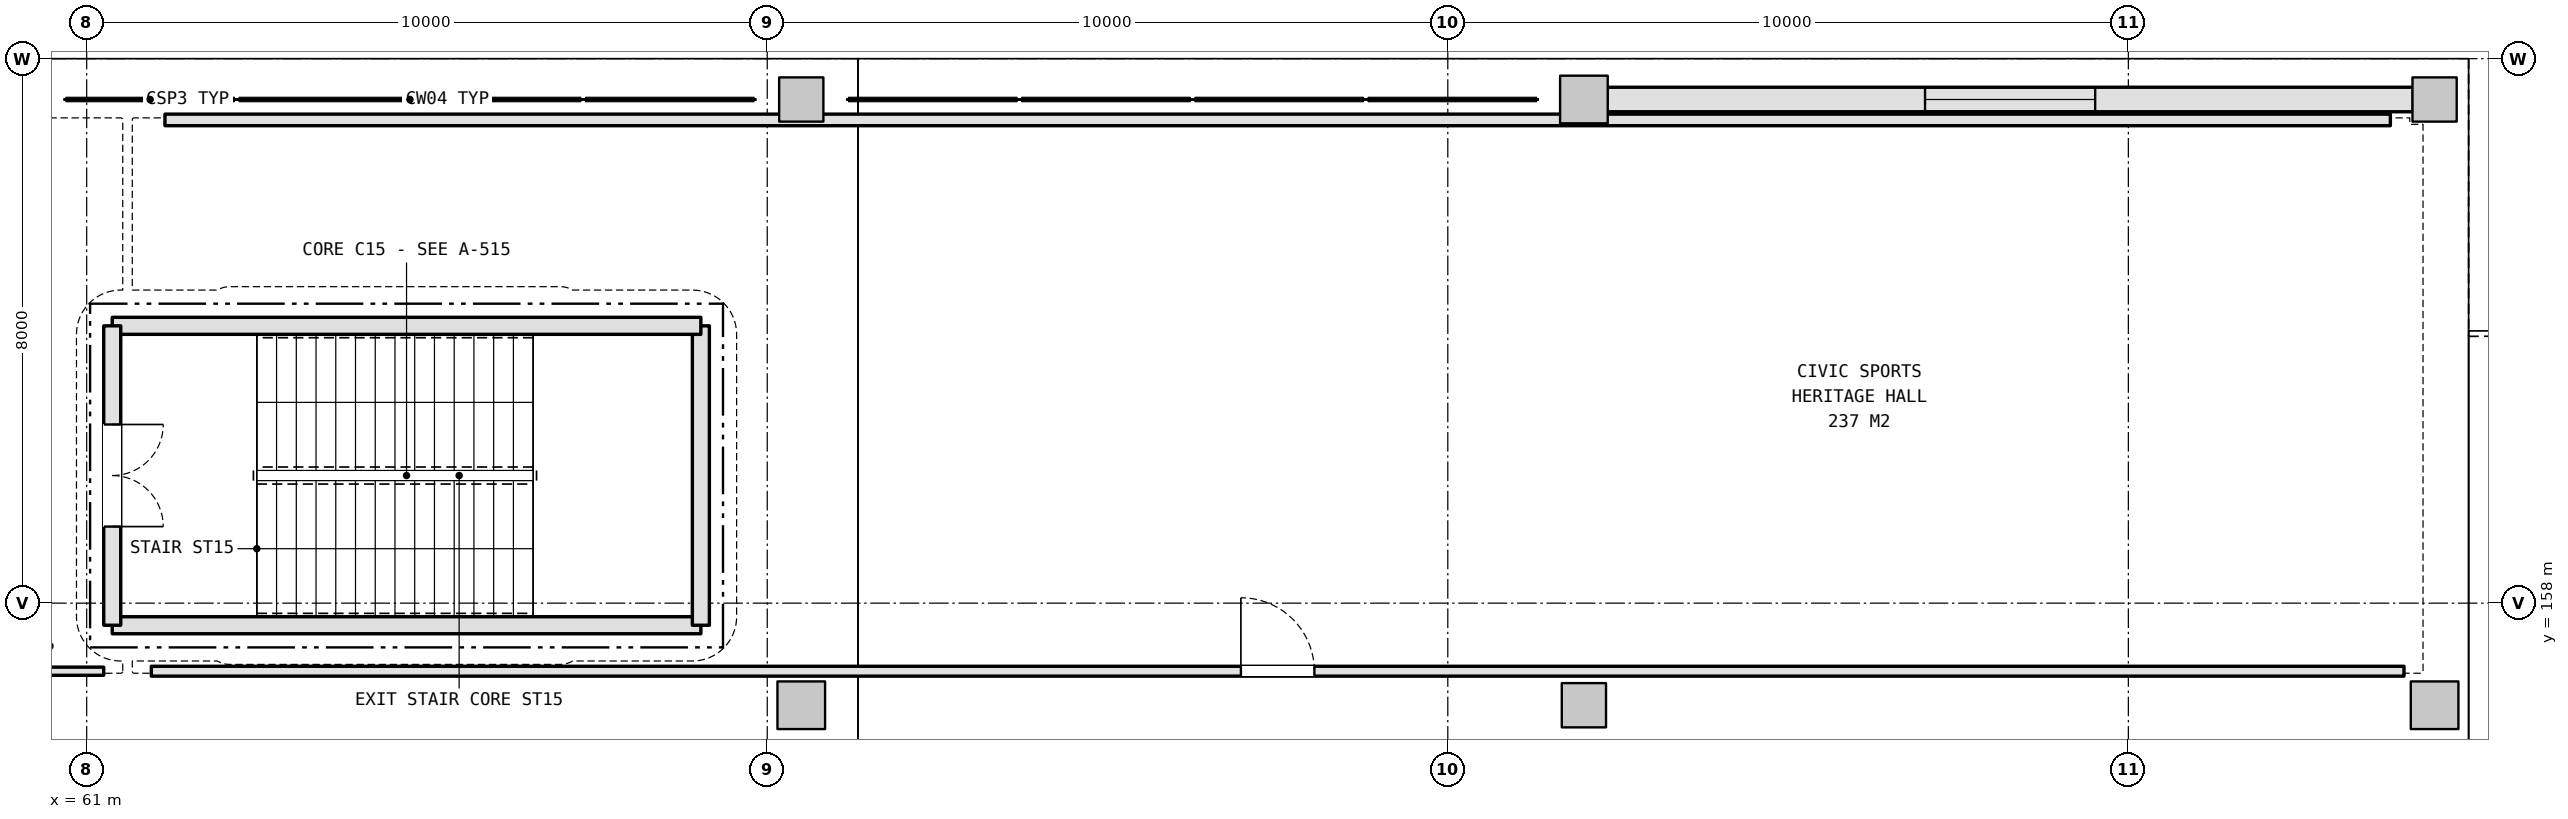
"""IFC4 building model, lengths in metres.
Left out: names, types, materials, properties, quantities, classifications, styles, units other than length and angle.
Written with IfcOpenShell. Run it as: python <this file> out.ifc"""

import sys

from ifc_helpers import new_model, si_unit, direction, frame, frame_2d, origin, origin_2d, place, context, subcontext, project, spatial, rectangle, extrude, element, fill, save


model = new_model("IFC4")
c1 = context("Model", 3, precision=1e-05, world=origin(), true_north=direction((0.0, 1.0)))
c2 = subcontext(c1, "Body", "Model", "MODEL_VIEW")
j1 = project(units=[si_unit("LENGTHUNIT", "METRE"), si_unit("PLANEANGLEUNIT", "RADIAN")], contexts=[c1])
p1 = place(None, origin())
s1 = spatial("IfcSite", under=j1, at=p1, CompositionType="ELEMENT")
p2 = place(p1, origin())
s2 = spatial("IfcBuilding", under=s1, at=p2, CompositionType="ELEMENT")
p3 = place(p2, frame((0.0, 0.0, 10.8)))
s3 = spatial("IfcBuildingStorey", under=s2, at=p3, CompositionType="ELEMENT", Elevation=10.8)
p4 = place(p3, frame((71.5, 156.5, 0.0), z_axis=(0.0, 0.0, 1.0), x_axis=(1.0, 0.0, 0.0)))
e1 = element("IfcColumn", 1, at=p4, inside=s3, PredefinedType="COLUMN", context=c2, shape_type="SweptSolid", body=[
    extrude(rectangle(XDim=0.7, YDim=0.7, at=origin_2d()), origin(), (0.0, 0.0, 1.0), 5.4),
])
for number, where, z_axis, x_axis in (
    (2, (71.5, 165.4, 0.0), (0.0, 0.0, 1.0), (1.0, 0.0, 0.0)),
    (3, (83.0, 156.5, 0.0), (0.0, 0.0, 1.0), (1.0, 0.0, 0.0)),
):
    element("IfcColumn", number, at=place(p3, frame(where, z_axis=z_axis, x_axis=x_axis)), inside=s3, PredefinedType="COLUMN", context=c2, shape_type="SweptSolid", body=[
        extrude(rectangle(XDim=0.65, YDim=0.65, at=origin_2d()), origin(), (0.0, 0.0, 1.0), 5.4),
    ])
for number, where, z_axis, x_axis in (
    (4, (83.0, 165.4, 0.0), (0.0, 0.0, 1.0), (1.0, 0.0, 0.0)),
    (5, (95.5, 156.5, 0.0), (0.0, 0.0, 1.0), (1.0, 0.0, 0.0)),
):
    element("IfcColumn", number, at=place(p3, frame(where, z_axis=z_axis, x_axis=x_axis)), inside=s3, PredefinedType="COLUMN", context=c2, shape_type="SweptSolid", body=[
        extrude(rectangle(XDim=0.7, YDim=0.7, at=origin_2d()), origin(), (0.0, 0.0, 1.0), 5.4),
    ])
p5 = place(p3, frame((95.5, 165.4, 0.0), z_axis=(0.0, 0.0, 1.0), x_axis=(1.0, 0.0, 0.0)))
e6 = element("IfcColumn", 6, at=p5, inside=s3, PredefinedType="COLUMN", context=c2, shape_type="SweptSolid", body=[
    extrude(rectangle(XDim=0.65, YDim=0.65, at=origin_2d()), origin(), (0.0, 0.0, 1.0), 5.4),
])
p6 = place(p3, frame((83.338, 165.4, 0.0), z_axis=(0.0, 0.0, 1.0), x_axis=(1.0, 0.0, 0.0)))
e7 = element("IfcWall", 7, at=p6, inside=s3, PredefinedType="SOLIDWALL", context=c2, shape_type="SweptSolid", body=[
    extrude(rectangle(XDim=11.849, YDim=0.36, at=frame_2d((5.925, 0.0))), origin(), (0.0, 0.0, 1.0), 4.455),
])
p7 = place(p6, frame((4.675, 0.0, 1.05)))
e8 = element("IfcOpeningElement", 8, at=p7, cuts=e7, PredefinedType="OPENING", context=c2, shape_type="SweptSolid", body=[
    extrude(rectangle(XDim=2.5, YDim=2.0, at=frame_2d((1.25, 1.0))), frame((0.0, 0.19, 0.0), z_axis=(0.0, -1.0, 0.0), x_axis=(1.0, 0.0, 0.0)), (0.0, 0.0, 1.0), 0.38),
])
p8 = place(p3, frame((61.375, 157.675, 0.0), z_axis=(0.0, 0.0, 1.0), x_axis=(1.0, 0.0, 0.0)))
e9 = element("IfcWall", 9, at=p8, inside=s3, PredefinedType="SHEAR", context=c2, shape_type="SweptSolid", body=[
    extrude(rectangle(XDim=8.649, YDim=0.25, at=frame_2d((4.325, 0.0))), origin(), (0.0, 0.0, 1.0), 5.15),
])
p9 = place(p3, frame((70.025, 157.675, 0.0), z_axis=(0.0, 0.0, 1.0), x_axis=(0.0, 1.0, 0.0)))
e10 = element("IfcWall", 10, at=p9, inside=s3, PredefinedType="SHEAR", context=c2, shape_type="SweptSolid", body=[
    extrude(rectangle(XDim=4.399, YDim=0.25, at=frame_2d((2.2, 0.0))), origin(), (0.0, 0.0, 1.0), 5.15),
])
p10 = place(p3, frame((70.025, 162.075, 0.0), z_axis=(0.0, 0.0, 1.0), x_axis=(-1.0, 0.0, 0.0)))
e11 = element("IfcWall", 11, at=p10, inside=s3, PredefinedType="SHEAR", context=c2, shape_type="SweptSolid", body=[
    extrude(rectangle(XDim=8.649, YDim=0.25, at=frame_2d((4.325, 0.0))), origin(), (0.0, 0.0, 1.0), 5.15),
])
p11 = place(p3, frame((61.375, 162.075, 0.0), z_axis=(0.0, 0.0, 1.0), x_axis=(0.0, -1.0, 0.0)))
e12 = element("IfcWall", 12, at=p11, inside=s3, PredefinedType="SHEAR", context=c2, shape_type="SweptSolid", body=[
    extrude(rectangle(XDim=4.399, YDim=0.25, at=frame_2d((2.2, 0.0))), origin(), (0.0, 0.0, 1.0), 5.15),
])
p12 = place(p11, frame((1.45, 0.0, 0.0)))
e13 = element("IfcOpeningElement", 13, at=p12, cuts=e12, PredefinedType="OPENING", context=c2, shape_type="SweptSolid", body=[
    extrude(rectangle(XDim=1.5, YDim=2.2, at=frame_2d((0.75, 1.1))), frame((0.0, 0.135, 0.0), z_axis=(0.0, -1.0, 0.0), x_axis=(1.0, 0.0, 0.0)), (0.0, 0.0, 1.0), 0.27),
])
p13 = place(p3, frame((61.25, 157.0, 0.0), z_axis=(0.0, 0.0, 1.0), x_axis=(-1.0, 0.0, 0.0)))
e14 = element("IfcWall", 14, at=p13, inside=s3, PredefinedType="PARTITIONING", context=c2, shape_type="SweptSolid", body=[
    extrude(rectangle(XDim=35.3, YDim=0.12, at=frame_2d((17.65, 0.0))), origin(), (0.0, 0.0, 1.0), 4.505),
])
p14 = place(p13, frame((17.15, 0.0, 0.0)))
e15 = element("IfcOpeningElement", 15, at=p14, cuts=e14, PredefinedType="OPENING", context=c2, shape_type="SweptSolid", body=[
    extrude(rectangle(XDim=1.0, YDim=2.15, at=frame_2d((0.5, 1.075))), frame((0.0, 0.07, 0.0), z_axis=(0.0, -1.0, 0.0), x_axis=(1.0, 0.0, 0.0)), (0.0, 0.0, 1.0), 0.14),
])
p15 = place(p3, frame((95.05, 157.0, 0.0), z_axis=(0.0, 0.0, 1.0), x_axis=(-1.0, 0.0, 0.0)))
e16 = element("IfcWall", 16, at=p15, inside=s3, PredefinedType="PARTITIONING", context=c2, shape_type="SweptSolid", body=[
    extrude(rectangle(XDim=33.1, YDim=0.145, at=frame_2d((16.55, 0.0))), origin(), (0.0, 0.0, 1.0), 4.505),
])
p16 = place(p15, frame((16.01, 0.0, 0.0)))
e17 = element("IfcOpeningElement", 17, at=p16, cuts=e16, PredefinedType="OPENING", context=c2, shape_type="SweptSolid", body=[
    extrude(rectangle(XDim=1.08, YDim=2.25, at=frame_2d((0.54, 1.125))), frame((0.0, 0.083, 0.0), z_axis=(0.0, -1.0, 0.0), x_axis=(1.0, 0.0, 0.0)), (0.0, 0.0, 1.0), 0.165),
])
p17 = place(p3, frame((62.15, 165.1, 0.0), z_axis=(0.0, 0.0, 1.0), x_axis=(1.0, 0.0, 0.0)))
e18 = element("IfcWall", 18, at=p17, inside=s3, PredefinedType="PARTITIONING", context=c2, shape_type="SweptSolid", body=[
    extrude(rectangle(XDim=32.7, YDim=0.17, at=frame_2d((16.35, 0.0))), origin(), (0.0, 0.0, 1.0), 4.455),
])
p18 = place(p7, origin())
e19 = element("IfcWindow", 19, at=p18, inside=s3, PartitioningType="SINGLE_PANEL", PredefinedType="WINDOW", context=c2, shape_type="SweptSolid", body=[
    extrude(rectangle(XDim=2.5, YDim=2.0, at=frame_2d((1.25, 1.0))), frame((0.0, 0.03, 0.0), z_axis=(0.0, -1.0, 0.0), x_axis=(1.0, 0.0, 0.0)), (0.0, 0.0, 1.0), 0.06),
])
fill(e8, e19)
p19 = place(p12, origin())
e20 = element("IfcDoor", 20, at=p19, inside=s3, OperationType="DOUBLE_DOOR_SINGLE_SWING", PredefinedType="DOOR", context=c2, shape_type="SweptSolid", body=[
    extrude(rectangle(XDim=1.5, YDim=2.2, at=frame_2d((0.75, 1.1))), frame((0.0, 0.025, 0.0), z_axis=(0.0, -1.0, 0.0), x_axis=(1.0, 0.0, 0.0)), (0.0, 0.0, 1.0), 0.05),
])
fill(e13, e20)
p20 = place(p16, frame((1.08, 0.0, 0.0), z_axis=(0.0, 0.0, 1.0), x_axis=(-1.0, 0.0, 0.0)))
e21 = element("IfcDoor", 21, at=p20, inside=s3, OperationType="SINGLE_SWING_RIGHT", PredefinedType="DOOR", context=c2, shape_type="SweptSolid", body=[
    extrude(rectangle(XDim=1.08, YDim=2.25, at=frame_2d((0.54, 1.125))), frame((0.0, 0.025, 0.0), z_axis=(0.0, -1.0, 0.0), x_axis=(1.0, 0.0, 0.0)), (0.0, 0.0, 1.0), 0.05),
])
fill(e17, e21)
save(model, sys.argv[1])
